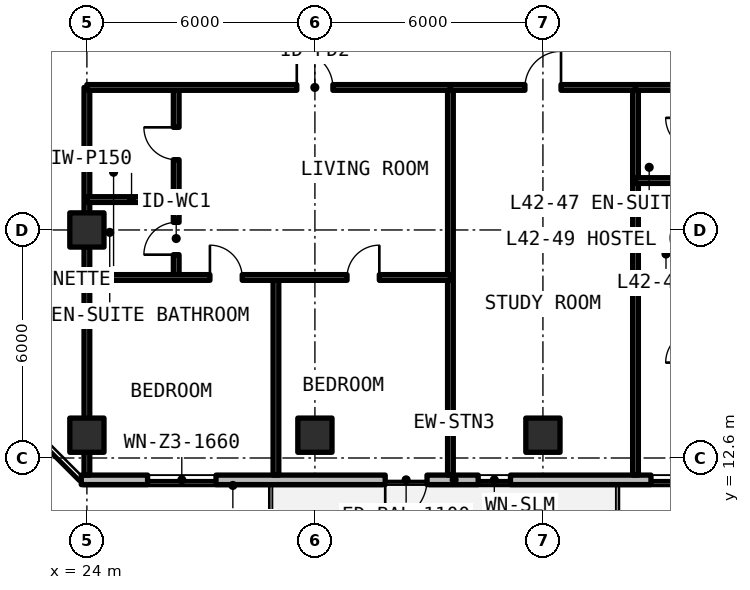
"""IFC4 building model, lengths in metres.
Left out: names, types, materials, properties, quantities, classifications, styles, units other than length and angle.
Written with IfcOpenShell. Run it as: python <this file> out.ifc"""

import sys

from ifc_helpers import new_model, si_unit, direction, frame, frame_2d, origin, origin_2d, place, context, subcontext, project, spatial, rectangle, extrude, element, fill, save


model = new_model("IFC4")
c1 = context("Model", 3, precision=1e-05, world=origin(), true_north=direction((0.0, 1.0)))
c2 = subcontext(c1, "Body", "Model", "MODEL_VIEW")
j1 = project(units=[si_unit("LENGTHUNIT", "METRE"), si_unit("PLANEANGLEUNIT", "RADIAN")], contexts=[c1])
p1 = place(None, origin())
s1 = spatial("IfcSite", under=j1, at=p1, CompositionType="ELEMENT")
p2 = place(p1, origin())
s2 = spatial("IfcBuilding", under=s1, at=p2, CompositionType="ELEMENT")
p3 = place(p2, frame((0.0, 0.0, 151.8)))
s3 = spatial("IfcBuildingStorey", under=s2, at=p3, CompositionType="ELEMENT", Elevation=151.8)
for number, where, z_axis, x_axis in (
    (1, (24.0, 18.6, 0.0), (0.0, 0.0, 1.0), (1.0, 0.0, 0.0)),
    (2, (24.0, 13.2, 0.0), (0.0, 0.0, 1.0), (1.0, 0.0, 0.0)),
    (3, (30.0, 13.2, 0.0), (0.0, 0.0, 1.0), (1.0, 0.0, 0.0)),
    (4, (36.0, 13.2, 0.0), (0.0, 0.0, 1.0), (1.0, 0.0, 0.0)),
):
    element("IfcColumn", number, at=place(p3, frame(where, z_axis=z_axis, x_axis=x_axis)), inside=s3, PredefinedType="COLUMN", context=c2, shape_type="SweptSolid", body=[
        extrude(rectangle(XDim=0.9, YDim=0.9, at=origin_2d()), origin(), (0.0, 0.0, 1.0), 3.3),
    ])
p4 = place(p3, frame((23.852, 12.025, 0.0), z_axis=(0.0, 0.0, 1.0), x_axis=(1.0, 0.0, 0.0)))
e5 = element("IfcWall", 5, at=p4, inside=s3, PredefinedType="SOLIDWALL", context=c2, shape_type="SweptSolid", body=[
    extrude(rectangle(XDim=19.623, YDim=0.25, at=frame_2d((9.812, 0.0))), origin(), (0.0, 0.0, 1.0), 3.08),
])
p5 = place(p4, frame((7.998, 0.0, 0.0)))
e6 = element("IfcOpeningElement", 6, at=p5, cuts=e5, PredefinedType="OPENING", context=c2, shape_type="SweptSolid", body=[
    extrude(rectangle(XDim=1.1, YDim=2.15, at=frame_2d((0.55, 1.075))), frame((0.0, 0.135, 0.0), z_axis=(0.0, -1.0, 0.0), x_axis=(1.0, 0.0, 0.0)), (0.0, 0.0, 1.0), 0.27),
])
p6 = place(p4, frame((1.745, 0.0, 0.78)))
e7 = element("IfcOpeningElement", 7, at=p6, cuts=e5, PredefinedType="OPENING", context=c2, shape_type="SweptSolid", body=[
    extrude(rectangle(XDim=1.8, YDim=1.66, at=frame_2d((0.9, 0.83))), frame((0.0, 0.135, 0.0), z_axis=(0.0, -1.0, 0.0), x_axis=(1.0, 0.0, 0.0)), (0.0, 0.0, 1.0), 0.27),
])
p7 = place(p4, frame((10.444, 0.0, 0.78)))
e8 = element("IfcOpeningElement", 8, at=p7, cuts=e5, PredefinedType="OPENING", context=c2, shape_type="SweptSolid", body=[
    extrude(rectangle(XDim=0.85, YDim=1.65, at=frame_2d((0.425, 0.825))), frame((0.0, 0.135, 0.0), z_axis=(0.0, -1.0, 0.0), x_axis=(1.0, 0.0, 0.0)), (0.0, 0.0, 1.0), 0.27),
])
p8 = place(p4, frame((14.991, 0.0, 0.78)))
e9 = element("IfcOpeningElement", 9, at=p8, cuts=e5, PredefinedType="OPENING", context=c2, shape_type="SweptSolid", body=[
    extrude(rectangle(XDim=0.85, YDim=1.65, at=frame_2d((0.425, 0.825))), frame((0.0, 0.135, 0.0), z_axis=(0.0, -1.0, 0.0), x_axis=(1.0, 0.0, 0.0)), (0.0, 0.0, 1.0), 0.27),
])
p9 = place(p4, frame((16.693, 0.0, 0.78)))
e10 = element("IfcOpeningElement", 10, at=p9, cuts=e5, PredefinedType="OPENING", context=c2, shape_type="SweptSolid", body=[
    extrude(rectangle(XDim=0.85, YDim=1.65, at=frame_2d((0.425, 0.825))), frame((0.0, 0.135, 0.0), z_axis=(0.0, -1.0, 0.0), x_axis=(1.0, 0.0, 0.0)), (0.0, 0.0, 1.0), 0.27),
])
for number, where, z_axis, x_axis in (
    (11, (24.0, 12.15, 0.0), (0.0, 0.0, 1.0), (0.0, 1.0, 0.0)),
    (12, (33.566, 12.15, 0.0), (0.0, 0.0, 1.0), (0.0, 1.0, 0.0)),
):
    element("IfcWall", number, at=place(p3, frame(where, z_axis=z_axis, x_axis=x_axis)), inside=s3, PredefinedType="SOLIDWALL", context=c2, shape_type="SweptSolid", body=[
        extrude(rectangle(XDim=10.2, YDim=0.15, at=frame_2d((5.1, 0.0))), origin(), (0.0, 0.0, 1.0), 2.35),
    ])
p10 = place(p3, frame((24.0, 19.4, 0.0), z_axis=(0.0, 0.0, 1.0), x_axis=(1.0, 0.0, 0.0)))
e13 = element("IfcWall", 13, at=p10, inside=s3, PredefinedType="PARTITIONING", context=c2, shape_type="SweptSolid", body=[
    extrude(rectangle(XDim=2.35, YDim=0.15, at=frame_2d((1.175, 0.0))), origin(), (0.0, 0.0, 1.0), 2.35),
])
p11 = place(p3, frame((26.35, 17.35, 0.0), z_axis=(0.0, 0.0, 1.0), x_axis=(0.0, 1.0, 0.0)))
e14 = element("IfcWall", 14, at=p11, inside=s3, PredefinedType="PARTITIONING", context=c2, shape_type="SweptSolid", body=[
    extrude(rectangle(XDim=5.0, YDim=0.15, at=frame_2d((2.5, 0.0))), origin(), (0.0, 0.0, 1.0), 2.35),
])
p12 = place(p11, frame((0.6, 0.0, 0.0)))
e15 = element("IfcOpeningElement", 15, at=p12, cuts=e14, PredefinedType="OPENING", context=c2, shape_type="SweptSolid", body=[
    extrude(rectangle(XDim=0.85, YDim=2.1, at=frame_2d((0.425, 1.05))), frame((0.0, 0.085, 0.0), z_axis=(0.0, -1.0, 0.0), x_axis=(1.0, 0.0, 0.0)), (0.0, 0.0, 1.0), 0.17),
])
p13 = place(p11, frame((3.1, 0.0, 0.0)))
e16 = element("IfcOpeningElement", 16, at=p13, cuts=e14, PredefinedType="OPENING", context=c2, shape_type="SweptSolid", body=[
    extrude(rectangle(XDim=0.85, YDim=2.1, at=frame_2d((0.425, 1.05))), frame((0.0, 0.085, 0.0), z_axis=(0.0, -1.0, 0.0), x_axis=(1.0, 0.0, 0.0)), (0.0, 0.0, 1.0), 0.17),
])
p14 = place(p3, frame((28.974, 12.15, 0.0), z_axis=(0.0, 0.0, 1.0), x_axis=(0.0, 1.0, 0.0)))
e17 = element("IfcWall", 17, at=p14, inside=s3, PredefinedType="PARTITIONING", context=c2, shape_type="SweptSolid", body=[
    extrude(rectangle(XDim=5.2, YDim=0.15, at=frame_2d((2.6, 0.0))), origin(), (0.0, 0.0, 1.0), 2.35),
])
p15 = place(p3, frame((24.0, 17.35, 0.0), z_axis=(0.0, 0.0, 1.0), x_axis=(1.0, 0.0, 0.0)))
e18 = element("IfcWall", 18, at=p15, inside=s3, PredefinedType="PARTITIONING", context=c2, shape_type="SweptSolid", body=[
    extrude(rectangle(XDim=9.566, YDim=0.15, at=frame_2d((4.783, 0.0))), origin(), (0.0, 0.0, 1.0), 2.35),
])
p16 = place(p15, frame((3.237, 0.0, 0.0)))
e19 = element("IfcOpeningElement", 19, at=p16, cuts=e18, PredefinedType="OPENING", context=c2, shape_type="SweptSolid", body=[
    extrude(rectangle(XDim=0.85, YDim=2.1, at=frame_2d((0.425, 1.05))), frame((0.0, 0.085, 0.0), z_axis=(0.0, -1.0, 0.0), x_axis=(1.0, 0.0, 0.0)), (0.0, 0.0, 1.0), 0.17),
])
p17 = place(p15, frame((6.845, 0.0, 0.0)))
e20 = element("IfcOpeningElement", 20, at=p17, cuts=e18, PredefinedType="OPENING", context=c2, shape_type="SweptSolid", body=[
    extrude(rectangle(XDim=0.85, YDim=2.1, at=frame_2d((0.425, 1.05))), frame((0.0, 0.085, 0.0), z_axis=(0.0, -1.0, 0.0), x_axis=(1.0, 0.0, 0.0)), (0.0, 0.0, 1.0), 0.17),
])
p18 = place(p3, frame((24.0, 22.35, 0.0), z_axis=(0.0, 0.0, 1.0), x_axis=(1.0, 0.0, 0.0)))
e21 = element("IfcWall", 21, at=p18, inside=s3, PredefinedType="SOLIDWALL", context=c2, shape_type="SweptSolid", body=[
    extrude(rectangle(XDim=9.566, YDim=0.15, at=frame_2d((4.783, 0.0))), origin(), (0.0, 0.0, 1.0), 2.35),
])
p19 = place(p18, frame((5.523, 0.0, 0.0)))
e22 = element("IfcOpeningElement", 22, at=p19, cuts=e21, PredefinedType="OPENING", context=c2, shape_type="SweptSolid", body=[
    extrude(rectangle(XDim=0.95, YDim=2.15, at=frame_2d((0.475, 1.075))), frame((0.0, 0.085, 0.0), z_axis=(0.0, -1.0, 0.0), x_axis=(1.0, 0.0, 0.0)), (0.0, 0.0, 1.0), 0.17),
])
p20 = place(p3, frame((38.436, 12.15, 0.0), z_axis=(0.0, 0.0, 1.0), x_axis=(0.0, 1.0, 0.0)))
e23 = element("IfcWall", 23, at=p20, inside=s3, PredefinedType="SOLIDWALL", context=c2, shape_type="SweptSolid", body=[
    extrude(rectangle(XDim=10.2, YDim=0.15, at=frame_2d((5.1, 0.0))), origin(), (0.0, 0.0, 1.0), 2.35),
])
p21 = place(p3, frame((33.566, 22.35, 0.0), z_axis=(0.0, 0.0, 1.0), x_axis=(1.0, 0.0, 0.0)))
e24 = element("IfcWall", 24, at=p21, inside=s3, PredefinedType="SOLIDWALL", context=c2, shape_type="SweptSolid", body=[
    extrude(rectangle(XDim=4.87, YDim=0.15, at=frame_2d((2.435, 0.0))), origin(), (0.0, 0.0, 1.0), 2.35),
])
p22 = place(p21, frame((1.96, 0.0, 0.0)))
e25 = element("IfcOpeningElement", 25, at=p22, cuts=e24, PredefinedType="OPENING", context=c2, shape_type="SweptSolid", body=[
    extrude(rectangle(XDim=0.95, YDim=2.15, at=frame_2d((0.475, 1.075))), frame((0.0, 0.085, 0.0), z_axis=(0.0, -1.0, 0.0), x_axis=(1.0, 0.0, 0.0)), (0.0, 0.0, 1.0), 0.17),
])
p23 = place(p3, frame((38.436, 19.9, 0.0), z_axis=(0.0, 0.0, 1.0), x_axis=(1.0, 0.0, 0.0)))
e26 = element("IfcWall", 26, at=p23, inside=s3, PredefinedType="PARTITIONING", context=c2, shape_type="SweptSolid", body=[
    extrude(rectangle(XDim=1.644, YDim=0.15, at=frame_2d((0.822, 0.0))), origin(), (0.0, 0.0, 1.0), 2.35),
])
p24 = place(p3, frame((38.436, 22.35, 0.0), z_axis=(0.0, 0.0, 1.0), x_axis=(1.0, 0.0, 0.0)))
e27 = element("IfcWall", 27, at=p24, inside=s3, PredefinedType="SOLIDWALL", context=c2, shape_type="SweptSolid", body=[
    extrude(rectangle(XDim=5.044, YDim=0.15, at=frame_2d((2.522, 0.0))), origin(), (0.0, 0.0, 1.0), 2.35),
])
p25 = place(p24, frame((2.909, 0.0, 0.0)))
e28 = element("IfcOpeningElement", 28, at=p25, cuts=e27, PredefinedType="OPENING", context=c2, shape_type="SweptSolid", body=[
    extrude(rectangle(XDim=0.95, YDim=2.15, at=frame_2d((0.475, 1.075))), frame((0.0, 0.085, 0.0), z_axis=(0.0, -1.0, 0.0), x_axis=(1.0, 0.0, 0.0)), (0.0, 0.0, 1.0), 0.17),
])
p26 = place(p5, frame((1.1, 0.0, 0.0), z_axis=(0.0, 0.0, 1.0), x_axis=(-1.0, 0.0, 0.0)))
e29 = element("IfcDoor", 29, at=p26, inside=s3, OperationType="SINGLE_SWING_RIGHT", PredefinedType="DOOR", context=c2, shape_type="SweptSolid", body=[
    extrude(rectangle(XDim=1.1, YDim=2.15, at=frame_2d((0.55, 1.075))), frame((0.0, 0.025, 0.0), z_axis=(0.0, -1.0, 0.0), x_axis=(1.0, 0.0, 0.0)), (0.0, 0.0, 1.0), 0.05),
])
fill(e6, e29)
p27 = place(p6, origin())
e30 = element("IfcWindow", 30, at=p27, inside=s3, PartitioningType="SINGLE_PANEL", PredefinedType="WINDOW", context=c2, shape_type="SweptSolid", body=[
    extrude(rectangle(XDim=1.8, YDim=1.66, at=frame_2d((0.9, 0.83))), frame((0.0, 0.03, 0.0), z_axis=(0.0, -1.0, 0.0), x_axis=(1.0, 0.0, 0.0)), (0.0, 0.0, 1.0), 0.06),
])
fill(e7, e30)
p28 = place(p7, origin())
e31 = element("IfcWindow", 31, at=p28, inside=s3, PartitioningType="SINGLE_PANEL", PredefinedType="WINDOW", context=c2, shape_type="SweptSolid", body=[
    extrude(rectangle(XDim=0.85, YDim=1.65, at=frame_2d((0.425, 0.825))), frame((0.0, 0.03, 0.0), z_axis=(0.0, -1.0, 0.0), x_axis=(1.0, 0.0, 0.0)), (0.0, 0.0, 1.0), 0.06),
])
fill(e8, e31)
p29 = place(p8, origin())
e32 = element("IfcWindow", 32, at=p29, inside=s3, PartitioningType="SINGLE_PANEL", PredefinedType="WINDOW", context=c2, shape_type="SweptSolid", body=[
    extrude(rectangle(XDim=0.85, YDim=1.65, at=frame_2d((0.425, 0.825))), frame((0.0, 0.03, 0.0), z_axis=(0.0, -1.0, 0.0), x_axis=(1.0, 0.0, 0.0)), (0.0, 0.0, 1.0), 0.06),
])
fill(e9, e32)
p30 = place(p12, origin())
e33 = element("IfcDoor", 33, at=p30, inside=s3, OperationType="SINGLE_SWING_LEFT", PredefinedType="DOOR", context=c2, shape_type="SweptSolid", body=[
    extrude(rectangle(XDim=0.85, YDim=2.1, at=frame_2d((0.425, 1.05))), frame((0.0, 0.025, 0.0), z_axis=(0.0, -1.0, 0.0), x_axis=(1.0, 0.0, 0.0)), (0.0, 0.0, 1.0), 0.05),
])
fill(e15, e33)
p31 = place(p13, origin())
e34 = element("IfcDoor", 34, at=p31, inside=s3, OperationType="SINGLE_SWING_RIGHT", PredefinedType="DOOR", context=c2, shape_type="SweptSolid", body=[
    extrude(rectangle(XDim=0.85, YDim=2.1, at=frame_2d((0.425, 1.05))), frame((0.0, 0.025, 0.0), z_axis=(0.0, -1.0, 0.0), x_axis=(1.0, 0.0, 0.0)), (0.0, 0.0, 1.0), 0.05),
])
fill(e16, e34)
p32 = place(p16, origin())
e35 = element("IfcDoor", 35, at=p32, inside=s3, OperationType="SINGLE_SWING_LEFT", PredefinedType="DOOR", context=c2, shape_type="SweptSolid", body=[
    extrude(rectangle(XDim=0.85, YDim=2.1, at=frame_2d((0.425, 1.05))), frame((0.0, 0.025, 0.0), z_axis=(0.0, -1.0, 0.0), x_axis=(1.0, 0.0, 0.0)), (0.0, 0.0, 1.0), 0.05),
])
fill(e19, e35)
p33 = place(p17, origin())
e36 = element("IfcDoor", 36, at=p33, inside=s3, OperationType="SINGLE_SWING_RIGHT", PredefinedType="DOOR", context=c2, shape_type="SweptSolid", body=[
    extrude(rectangle(XDim=0.85, YDim=2.1, at=frame_2d((0.425, 1.05))), frame((0.0, 0.025, 0.0), z_axis=(0.0, -1.0, 0.0), x_axis=(1.0, 0.0, 0.0)), (0.0, 0.0, 1.0), 0.05),
])
fill(e20, e36)
p34 = place(p19, origin())
e37 = element("IfcDoor", 37, at=p34, inside=s3, OperationType="SINGLE_SWING_LEFT", PredefinedType="DOOR", context=c2, shape_type="SweptSolid", body=[
    extrude(rectangle(XDim=0.95, YDim=2.15, at=frame_2d((0.475, 1.075))), frame((0.0, 0.025, 0.0), z_axis=(0.0, -1.0, 0.0), x_axis=(1.0, 0.0, 0.0)), (0.0, 0.0, 1.0), 0.05),
])
fill(e22, e37)
p35 = place(p22, origin())
e38 = element("IfcDoor", 38, at=p35, inside=s3, OperationType="SINGLE_SWING_RIGHT", PredefinedType="DOOR", context=c2, shape_type="SweptSolid", body=[
    extrude(rectangle(XDim=0.95, YDim=2.15, at=frame_2d((0.475, 1.075))), frame((0.0, 0.025, 0.0), z_axis=(0.0, -1.0, 0.0), x_axis=(1.0, 0.0, 0.0)), (0.0, 0.0, 1.0), 0.05),
])
fill(e25, e38)
save(model, sys.argv[1])
